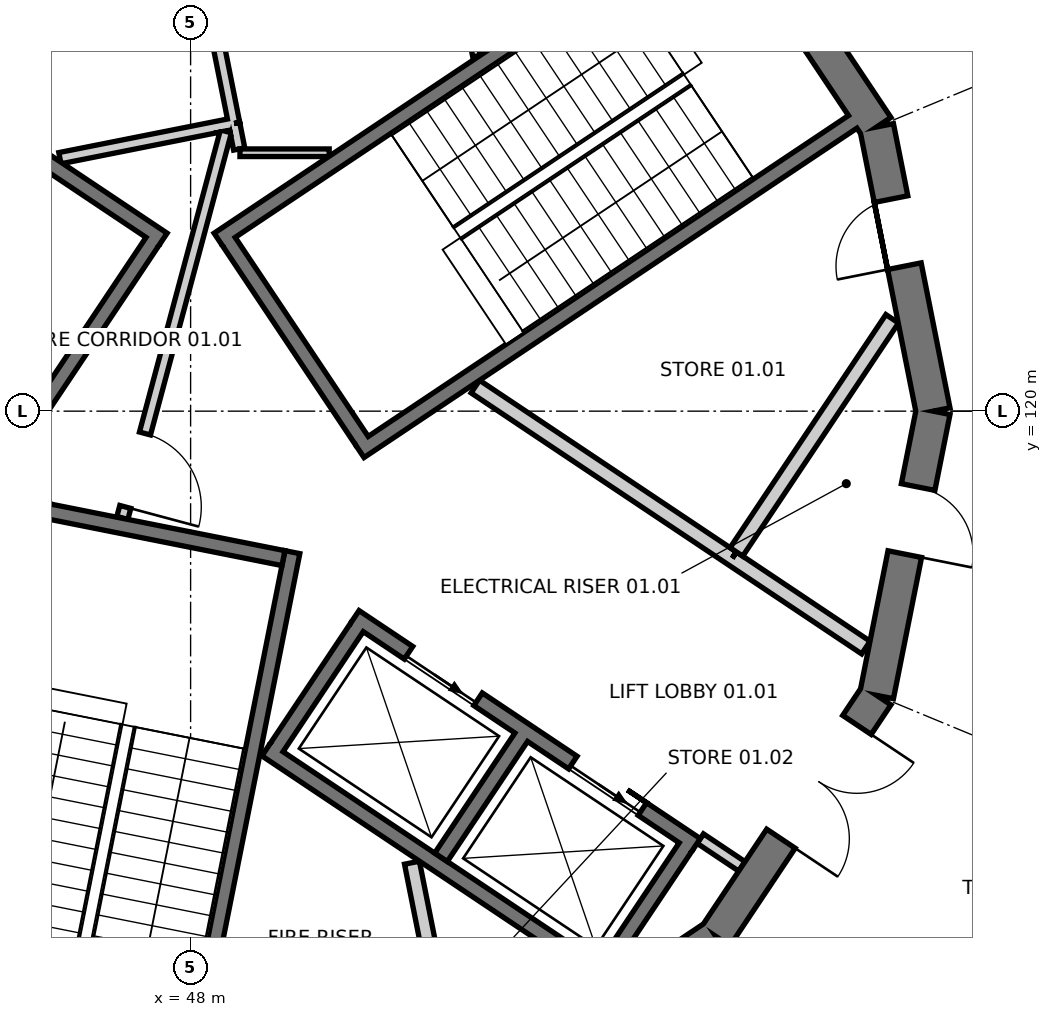
"""IFC4 building model, lengths in metres.
Left out: names, types, materials, properties, quantities, classifications, styles, units other than length and angle.
Written with IfcOpenShell. Run it as: python <this file> out.ifc"""

import sys

from ifc_helpers import new_model, si_unit, direction, frame, frame_2d, origin, place, context, subcontext, project, spatial, polyline, rectangle, outline, extrude, element, fill, save


model = new_model("IFC4")
c1 = context("Model", 3, precision=1e-05, world=origin(), true_north=direction((0.0, 1.0)))
c2 = subcontext(c1, "Body", "Model", "MODEL_VIEW")
j1 = project(units=[si_unit("LENGTHUNIT", "METRE"), si_unit("PLANEANGLEUNIT", "RADIAN")], contexts=[c1])
p1 = place(None, origin())
s1 = spatial("IfcSite", under=j1, at=p1, CompositionType="ELEMENT")
p2 = place(p1, origin())
s2 = spatial("IfcBuilding", under=s1, at=p2, CompositionType="ELEMENT")
p3 = place(p2, frame((0.0, 0.0, 6.0)))
s3 = spatial("IfcBuildingStorey", under=s2, at=p3, CompositionType="ELEMENT", Elevation=6.0)
p4 = place(p3, frame((57.771, 120.0, 0.0), z_axis=(0.0, 0.0, 1.0), x_axis=(-0.195069197673, 0.98078948206, 0.0)))
e1 = element("IfcWall", 1, at=p4, inside=s3, PredefinedType="SHEAR", context=c2, shape_type="SweptSolid", body=[
    extrude(outline(polyline([(-0.045, -0.225), (3.857, -0.225), (3.768, 0.225), (0.045, 0.225), (-0.045, -0.225)])), origin(), (0.0, 0.0, 1.0), 4.8),
])
p5 = place(p4, frame((1.945, 0.0, 0.0)))
e2 = element("IfcOpeningElement", 2, at=p5, cuts=e1, PredefinedType="OPENING", context=c2, shape_type="SweptSolid", body=[
    extrude(rectangle(XDim=0.9, YDim=2.1, at=frame_2d((0.45, 1.05))), frame((0.0, 0.235, 0.0), z_axis=(0.0, -1.0, 0.0), x_axis=(1.0, 0.0, 0.0)), (0.0, 0.0, 1.0), 0.47),
])
p6 = place(p3, frame((57.027, 123.739, 0.0), z_axis=(0.0, 0.0, 1.0), x_axis=(-0.555542277102, 0.83148829117, 0.0)))
e3 = element("IfcWall", 3, at=p6, inside=s3, PredefinedType="SHEAR", context=c2, shape_type="SweptSolid", body=[
    extrude(outline(polyline([(-0.045, -0.225), (3.857, -0.225), (3.768, 0.225), (0.045, 0.225), (-0.045, -0.225)])), origin(), (0.0, 0.0, 1.0), 4.8),
])
p7 = place(p6, frame((1.406, 0.0, 0.0)))
e4 = element("IfcOpeningElement", 4, at=p7, cuts=e3, PredefinedType="OPENING", context=c2, shape_type="SweptSolid", body=[
    extrude(rectangle(XDim=1.0, YDim=2.1, at=frame_2d((0.5, 1.05))), frame((0.0, 0.235, 0.0), z_axis=(0.0, -1.0, 0.0), x_axis=(1.0, 0.0, 0.0)), (0.0, 0.0, 1.0), 0.47),
])
p8 = place(p3, frame((51.739, 110.973, 0.0), z_axis=(0.0, 0.0, 1.0), x_axis=(0.83148829117, 0.555542277102, 0.0)))
e5 = element("IfcWall", 5, at=p8, inside=s3, PredefinedType="SHEAR", context=c2, shape_type="SweptSolid", body=[
    extrude(outline(polyline([(-0.045, -0.225), (3.857, -0.225), (3.768, 0.225), (0.045, 0.225), (-0.045, -0.225)])), origin(), (0.0, 0.0, 1.0), 4.8),
])
p9 = place(p8, frame((0.645, 0.0, 0.0)))
e6 = element("IfcOpeningElement", 6, at=p9, cuts=e5, PredefinedType="OPENING", context=c2, shape_type="SweptSolid", body=[
    extrude(rectangle(XDim=0.9, YDim=2.1, at=frame_2d((0.45, 1.05))), frame((0.0, 0.235, 0.0), z_axis=(0.0, -1.0, 0.0), x_axis=(1.0, 0.0, 0.0)), (0.0, 0.0, 1.0), 0.47),
])
p10 = place(p3, frame((54.909, 113.091, 0.0), z_axis=(0.0, 0.0, 1.0), x_axis=(0.555542277102, 0.83148829117, 0.0)))
e7 = element("IfcWall", 7, at=p10, inside=s3, PredefinedType="SHEAR", context=c2, shape_type="SweptSolid", body=[
    extrude(outline(polyline([(-0.045, -0.225), (3.857, -0.225), (3.768, 0.225), (0.045, 0.225), (-0.045, -0.225)])), origin(), (0.0, 0.0, 1.0), 4.8),
])
p11 = place(p10, frame((1.545, 0.0, 0.0)))
e8 = element("IfcOpeningElement", 8, at=p11, cuts=e7, PredefinedType="OPENING", context=c2, shape_type="SweptSolid", body=[
    extrude(rectangle(XDim=1.8, YDim=2.1, at=frame_2d((0.9, 1.05))), frame((0.0, 0.235, 0.0), z_axis=(0.0, -1.0, 0.0), x_axis=(1.0, 0.0, 0.0)), (0.0, 0.0, 1.0), 0.47),
])
p12 = place(p3, frame((57.027, 116.261, 0.0), z_axis=(0.0, 0.0, 1.0), x_axis=(0.195069197673, 0.98078948206, 0.0)))
e9 = element("IfcWall", 9, at=p12, inside=s3, PredefinedType="SHEAR", context=c2, shape_type="SweptSolid", body=[
    extrude(outline(polyline([(-0.045, -0.225), (3.857, -0.225), (3.768, 0.225), (0.045, 0.225), (-0.045, -0.225)])), origin(), (0.0, 0.0, 1.0), 4.8),
])
p13 = place(p12, frame((1.895, 0.0, 0.0)))
e10 = element("IfcOpeningElement", 10, at=p13, cuts=e9, PredefinedType="OPENING", context=c2, shape_type="SweptSolid", body=[
    extrude(rectangle(XDim=0.9, YDim=2.1, at=frame_2d((0.45, 1.05))), frame((0.0, 0.235, 0.0), z_axis=(0.0, -1.0, 0.0), x_axis=(1.0, 0.0, 0.0)), (0.0, 0.0, 1.0), 0.47),
])
p14 = place(p3, frame((48.365, 122.258, 0.0), z_axis=(0.0, 0.0, 1.0), x_axis=(0.831476803301, 0.555559470779, 0.0)))
e11 = element("IfcWall", 11, at=p14, inside=s3, PredefinedType="SHEAR", context=c2, shape_type="SweptSolid", body=[
    extrude(rectangle(XDim=7.8, YDim=0.2, at=frame_2d((3.9, 0.0))), origin(), (0.0, 0.0, 1.0), 4.8),
])
p15 = place(p3, frame((50.226, 119.473, 0.0), z_axis=(0.0, 0.0, 1.0), x_axis=(0.831486463828, 0.555545012102, 0.0)))
e12 = element("IfcWall", 12, at=p15, inside=s3, PredefinedType="SHEAR", context=c2, shape_type="SweptSolid", body=[
    extrude(rectangle(XDim=7.8, YDim=0.2, at=frame_2d((3.9, 0.0))), origin(), (0.0, 0.0, 1.0), 4.8),
])
p16 = place(p3, frame((50.253, 119.612, 0.0), z_axis=(0.0, 0.0, 1.0), x_axis=(-0.55555842186, 0.831477504146, 0.0)))
e13 = element("IfcWall", 13, at=p16, inside=s3, PredefinedType="SHEAR", context=c2, shape_type="SweptSolid", body=[
    extrude(rectangle(XDim=3.15, YDim=0.2, at=frame_2d((1.575, 0.0))), origin(), (0.0, 0.0, 1.0), 4.8),
])
p17 = place(p3, frame((47.635, 122.258, 0.0), z_axis=(0.0, 0.0, 1.0), x_axis=(-0.831476803301, 0.555559470779, 0.0)))
e14 = element("IfcWall", 14, at=p17, inside=s3, PredefinedType="SHEAR", context=c2, shape_type="SweptSolid", body=[
    extrude(rectangle(XDim=7.8, YDim=0.2, at=frame_2d((3.9, 0.0))), origin(), (0.0, 0.0, 1.0), 4.8),
])
p18 = place(p3, frame((47.497, 122.231, 0.0), z_axis=(0.0, 0.0, 1.0), x_axis=(-0.55555842186, -0.831477504146, 0.0)))
e15 = element("IfcWall", 15, at=p18, inside=s3, PredefinedType="SHEAR", context=c2, shape_type="SweptSolid", body=[
    extrude(rectangle(XDim=3.15, YDim=0.2, at=frame_2d((1.575, 0.0))), origin(), (0.0, 0.0, 1.0), 4.8),
])
p19 = place(p3, frame((49.339, 118.145, 0.0), z_axis=(0.0, 0.0, 1.0), x_axis=(-0.195092759861, -0.980784795483, 0.0)))
e16 = element("IfcWall", 16, at=p19, inside=s3, PredefinedType="SHEAR", context=c2, shape_type="SweptSolid", body=[
    extrude(rectangle(XDim=7.8, YDim=0.2, at=frame_2d((3.9, 0.0))), origin(), (0.0, 0.0, 1.0), 4.8),
])
p20 = place(p3, frame((46.132, 118.681, 0.0), z_axis=(0.0, 0.0, 1.0), x_axis=(0.980785830564, -0.195087556151, 0.0)))
e17 = element("IfcWall", 17, at=p20, inside=s3, PredefinedType="SHEAR", context=c2, shape_type="SweptSolid", body=[
    extrude(rectangle(XDim=3.15, YDim=0.2, at=frame_2d((1.575, 0.0))), origin(), (0.0, 0.0, 1.0), 4.8),
])
p21 = place(p3, frame((50.16, 117.293, 0.0), z_axis=(0.0, 0.0, 1.0), x_axis=(0.831479497601, -0.55555543834, 0.0)))
e18 = element("IfcWall", 18, at=p21, inside=s3, PredefinedType="SHEAR", context=c2, shape_type="SweptSolid", body=[
    extrude(rectangle(XDim=5.4, YDim=0.2, at=frame_2d((2.7, 0.0))), origin(), (0.0, 0.0, 1.0), 4.8),
])
p22 = place(p21, frame((0.85, 0.0, 0.0)))
e19 = element("IfcOpeningElement", 19, at=p22, cuts=e18, PredefinedType="OPENING", context=c2, shape_type="SweptSolid", body=[
    extrude(rectangle(XDim=1.1, YDim=2.1, at=frame_2d((0.55, 1.05))), frame((0.0, 0.11, 0.0), z_axis=(0.0, -1.0, 0.0), x_axis=(1.0, 0.0, 0.0)), (0.0, 0.0, 1.0), 0.22),
])
p23 = place(p21, frame((3.45, 0.0, 0.0)))
e20 = element("IfcOpeningElement", 20, at=p23, cuts=e18, PredefinedType="OPENING", context=c2, shape_type="SweptSolid", body=[
    extrude(rectangle(XDim=1.1, YDim=2.1, at=frame_2d((0.55, 1.05))), frame((0.0, 0.11, 0.0), z_axis=(0.0, -1.0, 0.0), x_axis=(1.0, 0.0, 0.0)), (0.0, 0.0, 1.0), 0.22),
])
p24 = place(p3, frame((48.994, 115.548, 0.0), z_axis=(0.0, 0.0, 1.0), x_axis=(0.831444656906, -0.555607579593, 0.0)))
e21 = element("IfcWall", 21, at=p24, inside=s3, PredefinedType="SHEAR", context=c2, shape_type="SweptSolid", body=[
    extrude(rectangle(XDim=5.4, YDim=0.2, at=frame_2d((2.7, 0.0))), origin(), (0.0, 0.0, 1.0), 4.8),
])
p25 = place(p3, frame((50.188, 117.155, 0.0), z_axis=(0.0, 0.0, 1.0), x_axis=(-0.555559945722, -0.831476485963, 0.0)))
e22 = element("IfcWall", 22, at=p25, inside=s3, PredefinedType="SHEAR", context=c2, shape_type="SweptSolid", body=[
    extrude(rectangle(XDim=1.9, YDim=0.2, at=frame_2d((0.95, 0.0))), origin(), (0.0, 0.0, 1.0), 4.8),
])
p26 = place(p3, frame((52.35, 115.71, 0.0), z_axis=(0.0, 0.0, 1.0), x_axis=(-0.55550058618, -0.831516144614, 0.0)))
e23 = element("IfcWall", 23, at=p26, inside=s3, PredefinedType="SHEAR", context=c2, shape_type="SweptSolid", body=[
    extrude(rectangle(XDim=1.9, YDim=0.2, at=frame_2d((0.95, 0.0))), origin(), (0.0, 0.0, 1.0), 4.8),
])
p27 = place(p3, frame((54.512, 114.266, 0.0), z_axis=(0.0, 0.0, 1.0), x_axis=(-0.555589423235, -0.83145678949, 0.0)))
e24 = element("IfcWall", 24, at=p27, inside=s3, PredefinedType="SHEAR", context=c2, shape_type="SweptSolid", body=[
    extrude(rectangle(XDim=1.9, YDim=0.2, at=frame_2d((0.95, 0.0))), origin(), (0.0, 0.0, 1.0), 4.8),
])
p28 = place(p3, frame((55.126, 118.065, 0.0), z_axis=(0.0, 0.0, 1.0), x_axis=(-0.831495502265, 0.555531483998, 0.0)))
e25 = element("IfcWall", 25, at=p28, inside=s3, PredefinedType="SOLIDWALL", context=c2, shape_type="SweptSolid", body=[
    extrude(rectangle(XDim=4.065, YDim=0.2, at=frame_2d((2.033, 0.0))), origin(), (0.0, 0.0, 1.0), 4.5),
])
p29 = place(p3, frame((57.231, 121.215, 0.0), z_axis=(0.0, 0.0, 1.0), x_axis=(-0.555600969312, -0.831449074147, 0.0)))
e26 = element("IfcWall", 26, at=p29, inside=s3, PredefinedType="SOLIDWALL", context=c2, shape_type="SweptSolid", body=[
    extrude(rectangle(XDim=3.689, YDim=0.2, at=frame_2d((1.844, 0.0))), origin(), (0.0, 0.0, 1.0), 4.5),
])
p30 = place(p3, frame((56.885, 116.89, 0.0), z_axis=(0.0, 0.0, 1.0), x_axis=(-0.831446094913, 0.555605427667, 0.0)))
e27 = element("IfcWall", 27, at=p30, inside=s3, PredefinedType="SOLIDWALL", context=c2, shape_type="SweptSolid", body=[
    extrude(rectangle(XDim=2.115, YDim=0.2, at=frame_2d((1.058, 0.0))), origin(), (0.0, 0.0, 1.0), 4.5),
])
p31 = place(p3, frame((48.056, 126.384, 0.0), z_axis=(0.0, 0.0, 1.0), x_axis=(0.195123903338, -0.980778600065, 0.0)))
e28 = element("IfcWall", 28, at=p31, inside=s3, PredefinedType="PARTITIONING", context=c2, shape_type="SweptSolid", body=[
    extrude(rectangle(XDim=2.65, YDim=0.15, at=frame_2d((1.325, 0.0))), origin(), (0.0, 0.0, 1.0), 4.5),
])
p32 = place(p3, frame((48.524, 123.775, 0.0), z_axis=(0.0, 0.0, 1.0), x_axis=(-0.980777249161, -0.195130693455, 0.0)))
e29 = element("IfcWall", 29, at=p32, inside=s3, PredefinedType="PARTITIONING", context=c2, shape_type="SweptSolid", body=[
    extrude(rectangle(XDim=2.287, YDim=0.15, at=frame_2d((1.144, 0.0))), origin(), (0.0, 0.0, 1.0), 4.5),
])
p33 = place(p3, frame((50.911, 128.943, 0.0), z_axis=(0.0, 0.0, 1.0), x_axis=(0.195113868301, -0.980780596462, 0.0)))
e30 = element("IfcWall", 30, at=p33, inside=s3, PredefinedType="PARTITIONING", context=c2, shape_type="SweptSolid", body=[
    extrude(rectangle(XDim=4.357, YDim=0.1, at=frame_2d((2.178, 0.0))), origin(), (0.0, 0.0, 1.0), 4.5),
])
p34 = place(p3, frame((49.823, 123.4, 0.0), z_axis=(0.0, 0.0, 1.0), x_axis=(-1.0, 0.0, 0.0)))
e31 = element("IfcWall", 31, at=p34, inside=s3, PredefinedType="PARTITIONING", context=c2, shape_type="SweptSolid", body=[
    extrude(rectangle(XDim=1.174, YDim=0.1, at=frame_2d((0.587, 0.0))), origin(), (0.0, 0.0, 1.0), 4.5),
])
p35 = place(p3, frame((48.639, 123.449, 0.0), z_axis=(0.0, 0.0, 1.0), x_axis=(-0.194880473507, 0.98082699853, 0.0)))
e32 = element("IfcWall", 32, at=p35, inside=s3, PredefinedType="PARTITIONING", context=c2, shape_type="SweptSolid", body=[
    extrude(rectangle(XDim=0.342, YDim=0.15, at=frame_2d((0.171, 0.0))), origin(), (0.0, 0.0, 1.0), 4.5),
])
p36 = place(p3, frame((50.912, 114.059, 0.0), z_axis=(0.0, 0.0, 1.0), x_axis=(0.195101986683, -0.980782960085, 0.0)))
e33 = element("IfcWall", 33, at=p36, inside=s3, PredefinedType="SOLIDWALL", context=c2, shape_type="SweptSolid", body=[
    extrude(rectangle(XDim=2.963, YDim=0.2, at=frame_2d((1.481, 0.0))), origin(), (0.0, 0.0, 1.0), 4.5),
])
p37 = place(p3, frame((54.706, 114.377, 0.0), z_axis=(0.0, 0.0, 1.0), x_axis=(0.831421626399, -0.555642042286, 0.0)))
e34 = element("IfcWall", 34, at=p37, inside=s3, PredefinedType="PARTITIONING", context=c2, shape_type="SweptSolid", body=[
    extrude(rectangle(XDim=0.658, YDim=0.15, at=frame_2d((0.329, 0.0))), origin(), (0.0, 0.0, 1.0), 4.5),
])
p38 = place(p3, frame((47.102, 118.595, 0.0), z_axis=(0.0, 0.0, 1.0), x_axis=(0.258814124304, 0.9659271448, 0.0)))
e35 = element("IfcWall", 35, at=p38, inside=s3, PredefinedType="PARTITIONING", context=c2, shape_type="SweptSolid", body=[
    extrude(rectangle(XDim=5.265, YDim=0.15, at=frame_2d((2.632, 0.0))), origin(), (0.0, 0.0, 1.0), 4.5),
])
p39 = place(p38, frame((0.15, 0.0, 0.0)))
e36 = element("IfcOpeningElement", 36, at=p39, cuts=e35, PredefinedType="OPENING", context=c2, shape_type="SweptSolid", body=[
    extrude(rectangle(XDim=1.0, YDim=2.1, at=frame_2d((0.5, 1.05))), frame((0.0, 0.085, 0.0), z_axis=(0.0, -1.0, 0.0), x_axis=(1.0, 0.0, 0.0)), (0.0, 0.0, 1.0), 0.17),
])
p40 = place(p3, frame((60.01, 115.025, 0.0), z_axis=(0.0, 0.0, 1.0), x_axis=(-0.555577354854, -0.831464853601, 0.0)))
e37 = element("IfcWall", 37, at=p40, inside=s3, PredefinedType="PARTITIONING", context=c2, shape_type="SweptSolid", body=[
    extrude(rectangle(XDim=5.073, YDim=0.15, at=frame_2d((2.536, 0.0))), origin(), (0.0, 0.0, 1.0), 4.5),
])
p41 = place(p40, frame((1.636, 0.0, 0.0)))
e38 = element("IfcOpeningElement", 38, at=p41, cuts=e37, PredefinedType="OPENING", context=c2, shape_type="SweptSolid", body=[
    extrude(rectangle(XDim=1.8, YDim=2.1, at=frame_2d((0.9, 1.05))), frame((0.0, 0.085, 0.0), z_axis=(0.0, -1.0, 0.0), x_axis=(1.0, 0.0, 0.0)), (0.0, 0.0, 1.0), 0.17),
])
p42 = place(p22, origin())
e39 = element("IfcDoor", 39, at=p42, inside=s3, OperationType="SLIDING_TO_LEFT", PredefinedType="DOOR", context=c2, shape_type="SweptSolid", body=[
    extrude(rectangle(XDim=1.1, YDim=2.1, at=frame_2d((0.55, 1.05))), frame((0.0, 0.025, 0.0), z_axis=(0.0, -1.0, 0.0), x_axis=(1.0, 0.0, 0.0)), (0.0, 0.0, 1.0), 0.05),
])
fill(e19, e39)
p43 = place(p23, origin())
e40 = element("IfcDoor", 40, at=p43, inside=s3, OperationType="SLIDING_TO_LEFT", PredefinedType="DOOR", context=c2, shape_type="SweptSolid", body=[
    extrude(rectangle(XDim=1.1, YDim=2.1, at=frame_2d((0.55, 1.05))), frame((0.0, 0.025, 0.0), z_axis=(0.0, -1.0, 0.0), x_axis=(1.0, 0.0, 0.0)), (0.0, 0.0, 1.0), 0.05),
])
fill(e20, e40)
p44 = place(p5, origin())
e41 = element("IfcDoor", 41, at=p44, inside=s3, OperationType="SINGLE_SWING_LEFT", PredefinedType="DOOR", context=c2, shape_type="SweptSolid", body=[
    extrude(rectangle(XDim=0.9, YDim=2.1, at=frame_2d((0.45, 1.05))), frame((0.0, 0.025, 0.0), z_axis=(0.0, -1.0, 0.0), x_axis=(1.0, 0.0, 0.0)), (0.0, 0.0, 1.0), 0.05),
])
fill(e2, e41)
p45 = place(p13, frame((0.9, 0.0, 0.0), z_axis=(0.0, 0.0, 1.0), x_axis=(-1.0, 0.0, 0.0)))
e42 = element("IfcDoor", 42, at=p45, inside=s3, OperationType="SINGLE_SWING_RIGHT", PredefinedType="DOOR", context=c2, shape_type="SweptSolid", body=[
    extrude(rectangle(XDim=0.9, YDim=2.1, at=frame_2d((0.45, 1.05))), frame((0.0, 0.025, 0.0), z_axis=(0.0, -1.0, 0.0), x_axis=(1.0, 0.0, 0.0)), (0.0, 0.0, 1.0), 0.05),
])
fill(e10, e42)
p46 = place(p11, frame((1.8, 0.0, 0.0), z_axis=(0.0, 0.0, 1.0), x_axis=(-1.0, 0.0, 0.0)))
e43 = element("IfcDoor", 43, at=p46, inside=s3, OperationType="DOUBLE_DOOR_SINGLE_SWING", PredefinedType="DOOR", context=c2, shape_type="SweptSolid", body=[
    extrude(rectangle(XDim=1.8, YDim=2.1, at=frame_2d((0.9, 1.05))), frame((0.0, 0.025, 0.0), z_axis=(0.0, -1.0, 0.0), x_axis=(1.0, 0.0, 0.0)), (0.0, 0.0, 1.0), 0.05),
])
fill(e8, e43)
p47 = place(p39, frame((1.0, 0.0, 0.0), z_axis=(0.0, 0.0, 1.0), x_axis=(-1.0, 0.0, 0.0)))
e44 = element("IfcDoor", 44, at=p47, inside=s3, OperationType="SINGLE_SWING_RIGHT", PredefinedType="DOOR", context=c2, shape_type="SweptSolid", body=[
    extrude(rectangle(XDim=1.0, YDim=2.1, at=frame_2d((0.5, 1.05))), frame((0.0, 0.025, 0.0), z_axis=(0.0, -1.0, 0.0), x_axis=(1.0, 0.0, 0.0)), (0.0, 0.0, 1.0), 0.05),
])
fill(e36, e44)
p48 = place(p41, origin())
e45 = element("IfcDoor", 45, at=p48, inside=s3, OperationType="DOUBLE_DOOR_SINGLE_SWING", PredefinedType="DOOR", context=c2, shape_type="SweptSolid", body=[
    extrude(rectangle(XDim=1.8, YDim=2.1, at=frame_2d((0.9, 1.05))), frame((0.0, 0.025, 0.0), z_axis=(0.0, -1.0, 0.0), x_axis=(1.0, 0.0, 0.0)), (0.0, 0.0, 1.0), 0.05),
])
fill(e38, e45)
save(model, sys.argv[1])
